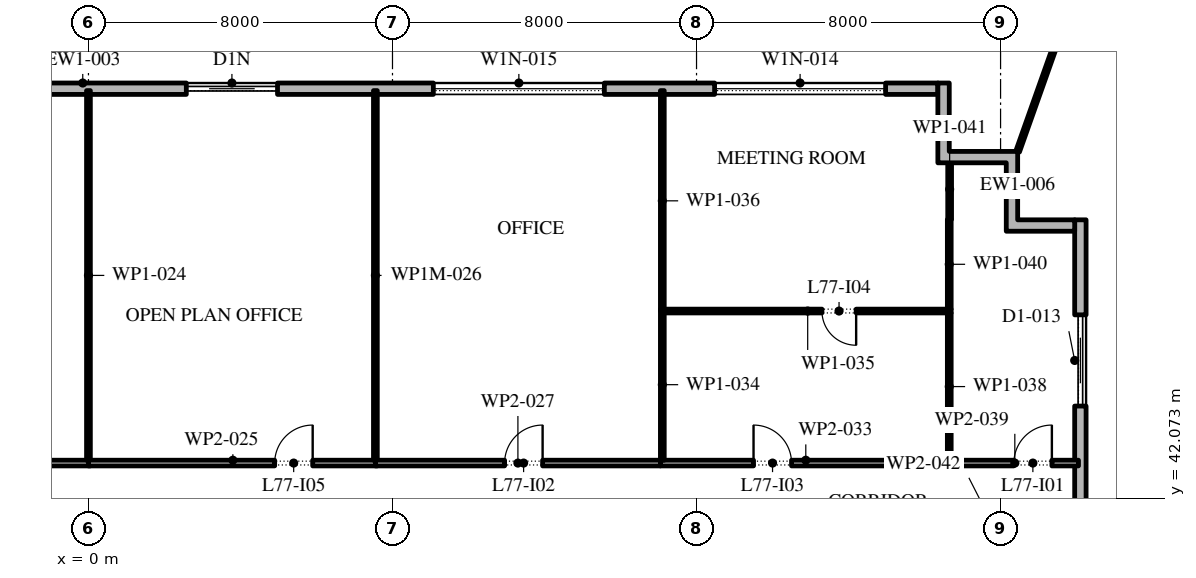
"""IFC4 building model, lengths in metres.
Left out: names, types, materials, properties, quantities, classifications, styles, units other than length and angle.
Written with IfcOpenShell. Run it as: python <this file> out.ifc"""

import sys

from ifc_helpers import new_model, si_unit, direction, frame, frame_2d, origin, place, context, subcontext, project, spatial, polyline, rectangle, outline, extrude, element, fill, save


model = new_model("IFC4")
c1 = context("Model", 3, precision=1e-05, world=origin(), true_north=direction((0.0, 1.0)))
c2 = subcontext(c1, "Body", "Model", "MODEL_VIEW")
j1 = project(units=[si_unit("LENGTHUNIT", "METRE"), si_unit("PLANEANGLEUNIT", "RADIAN")], contexts=[c1])
p1 = place(None, origin())
s1 = spatial("IfcSite", under=j1, at=p1, CompositionType="ELEMENT")
p2 = place(p1, origin())
s2 = spatial("IfcBuilding", under=s1, at=p2, CompositionType="ELEMENT")
p3 = place(p2, frame((0.0, 0.0, 351.0)))
s3 = spatial("IfcBuildingStorey", under=s2, at=p3, CompositionType="ELEMENT", Elevation=351.0)
p4 = place(p3, frame((26.1, -2.1, 0.0), z_axis=(0.0, 0.0, 1.0), x_axis=(0.0, 1.0, 0.0)))
e1 = element("IfcWall", 1, at=p4, inside=s3, PredefinedType="STANDARD", context=c2, shape_type="SweptSolid", body=[
    extrude(rectangle(XDim=51.5, YDim=0.3, at=frame_2d((25.75, 0.0))), origin(), (0.0, 0.0, 1.0), 4.0),
])
p5 = place(p4, frame((1.3, 0.0, 0.45)))
e2 = element("IfcOpeningElement", 2, at=p5, cuts=e1, PredefinedType="OPENING", context=c2, shape_type="SweptSolid", body=[
    extrude(rectangle(XDim=4.5, YDim=3.05, at=frame_2d((2.25, 1.525))), frame((0.0, 0.16, 0.0), z_axis=(0.0, -1.0, 0.0), x_axis=(1.0, 0.0, 0.0)), (0.0, 0.0, 1.0), 0.32),
])
p6 = place(p4, frame((8.55, 0.0, 0.45)))
e3 = element("IfcOpeningElement", 3, at=p6, cuts=e1, PredefinedType="OPENING", context=c2, shape_type="SweptSolid", body=[
    extrude(rectangle(XDim=4.5, YDim=3.05, at=frame_2d((2.25, 1.525))), frame((0.0, 0.16, 0.0), z_axis=(0.0, -1.0, 0.0), x_axis=(1.0, 0.0, 0.0)), (0.0, 0.0, 1.0), 0.32),
])
p7 = place(p4, frame((17.0, 0.0, 0.0)))
e4 = element("IfcOpeningElement", 4, at=p7, cuts=e1, PredefinedType="OPENING", context=c2, shape_type="SweptSolid", body=[
    extrude(rectangle(XDim=2.4, YDim=3.5, at=frame_2d((1.2, 1.75))), frame((0.0, 0.16, 0.0), z_axis=(0.0, -1.0, 0.0), x_axis=(1.0, 0.0, 0.0)), (0.0, 0.0, 1.0), 0.32),
])
p8 = place(p4, frame((23.35, 0.0, 0.45)))
e5 = element("IfcOpeningElement", 5, at=p8, cuts=e1, PredefinedType="OPENING", context=c2, shape_type="SweptSolid", body=[
    extrude(rectangle(XDim=4.5, YDim=3.05, at=frame_2d((2.25, 1.525))), frame((0.0, 0.16, 0.0), z_axis=(0.0, -1.0, 0.0), x_axis=(1.0, 0.0, 0.0)), (0.0, 0.0, 1.0), 0.32),
])
p9 = place(p4, frame((30.75, 0.0, 0.45)))
e6 = element("IfcOpeningElement", 6, at=p9, cuts=e1, PredefinedType="OPENING", context=c2, shape_type="SweptSolid", body=[
    extrude(rectangle(XDim=4.5, YDim=3.05, at=frame_2d((2.25, 1.525))), frame((0.0, 0.16, 0.0), z_axis=(0.0, -1.0, 0.0), x_axis=(1.0, 0.0, 0.0)), (0.0, 0.0, 1.0), 0.32),
])
p10 = place(p4, frame((38.15, 0.0, 0.45)))
e7 = element("IfcOpeningElement", 7, at=p10, cuts=e1, PredefinedType="OPENING", context=c2, shape_type="SweptSolid", body=[
    extrude(rectangle(XDim=4.5, YDim=3.05, at=frame_2d((2.25, 1.525))), frame((0.0, 0.16, 0.0), z_axis=(0.0, -1.0, 0.0), x_axis=(1.0, 0.0, 0.0)), (0.0, 0.0, 1.0), 0.32),
])
p11 = place(p4, frame((46.6, 0.0, 0.0)))
e8 = element("IfcOpeningElement", 8, at=p11, cuts=e1, PredefinedType="OPENING", context=c2, shape_type="SweptSolid", body=[
    extrude(rectangle(XDim=2.4, YDim=3.5, at=frame_2d((1.2, 1.75))), frame((0.0, 0.16, 0.0), z_axis=(0.0, -1.0, 0.0), x_axis=(1.0, 0.0, 0.0)), (0.0, 0.0, 1.0), 0.32),
])
p12 = place(p3, frame((22.35, 52.85, 0.0), z_axis=(0.0, 0.0, 1.0), x_axis=(-1.0, 0.0, 0.0)))
e9 = element("IfcWall", 9, at=p12, inside=s3, PredefinedType="STANDARD", context=c2, shape_type="SweptSolid", body=[
    extrude(rectangle(XDim=45.0, YDim=0.3, at=frame_2d((22.5, 0.0))), origin(), (0.0, 0.0, 1.0), 4.0),
])
p13 = place(p12, frame((1.375, 0.0, 0.45)))
e10 = element("IfcOpeningElement", 10, at=p13, cuts=e9, PredefinedType="OPENING", context=c2, shape_type="SweptSolid", body=[
    extrude(rectangle(XDim=4.5, YDim=2.525, at=frame_2d((2.25, 1.262))), frame((0.0, 0.16, 0.0), z_axis=(0.0, -1.0, 0.0), x_axis=(1.0, 0.0, 0.0)), (0.0, 0.0, 1.0), 0.32),
])
p14 = place(p12, frame((8.775, 0.0, 0.45)))
e11 = element("IfcOpeningElement", 11, at=p14, cuts=e9, PredefinedType="OPENING", context=c2, shape_type="SweptSolid", body=[
    extrude(rectangle(XDim=4.5, YDim=2.525, at=frame_2d((2.25, 1.262))), frame((0.0, 0.16, 0.0), z_axis=(0.0, -1.0, 0.0), x_axis=(1.0, 0.0, 0.0)), (0.0, 0.0, 1.0), 0.32),
])
p15 = place(p12, frame((17.375, 0.0, 0.0)))
e12 = element("IfcOpeningElement", 12, at=p15, cuts=e9, PredefinedType="OPENING", context=c2, shape_type="SweptSolid", body=[
    extrude(rectangle(XDim=2.4, YDim=2.975, at=frame_2d((1.2, 1.488))), frame((0.0, 0.16, 0.0), z_axis=(0.0, -1.0, 0.0), x_axis=(1.0, 0.0, 0.0)), (0.0, 0.0, 1.0), 0.32),
])
p16 = place(p12, frame((23.875, 0.0, 0.45)))
e13 = element("IfcOpeningElement", 13, at=p16, cuts=e9, PredefinedType="OPENING", context=c2, shape_type="SweptSolid", body=[
    extrude(rectangle(XDim=4.5, YDim=2.525, at=frame_2d((2.25, 1.262))), frame((0.0, 0.16, 0.0), z_axis=(0.0, -1.0, 0.0), x_axis=(1.0, 0.0, 0.0)), (0.0, 0.0, 1.0), 0.32),
])
p17 = place(p12, frame((31.425, 0.0, 0.45)))
e14 = element("IfcOpeningElement", 14, at=p17, cuts=e9, PredefinedType="OPENING", context=c2, shape_type="SweptSolid", body=[
    extrude(rectangle(XDim=4.5, YDim=2.525, at=frame_2d((2.25, 1.262))), frame((0.0, 0.16, 0.0), z_axis=(0.0, -1.0, 0.0), x_axis=(1.0, 0.0, 0.0)), (0.0, 0.0, 1.0), 0.32),
])
p18 = place(p12, frame((38.975, 0.0, 0.45)))
e15 = element("IfcOpeningElement", 15, at=p18, cuts=e9, PredefinedType="OPENING", context=c2, shape_type="SweptSolid", body=[
    extrude(rectangle(XDim=4.5, YDim=2.525, at=frame_2d((2.25, 1.262))), frame((0.0, 0.16, 0.0), z_axis=(0.0, -1.0, 0.0), x_axis=(1.0, 0.0, 0.0)), (0.0, 0.0, 1.0), 0.32),
])
p19 = place(p3, origin())
e16 = element("IfcWall", 16, at=p19, inside=s3, PredefinedType="STANDARD", context=c2, shape_type="SweptSolid", body=[
    extrude(outline(polyline([(24.15, 50.9), (22.35, 50.9), (22.35, 53.0), (22.65, 53.0), (22.65, 51.2), (24.45, 51.2), (24.45, 49.4), (25.95, 49.4), (25.95, 49.1), (24.15, 49.1), (24.15, 50.9)])), origin(), (0.0, 0.0, 1.0), 4.0),
])
p20 = place(p3, frame((24.45, 51.2, -0.05), z_axis=(0.0, 0.0, 1.0), x_axis=(0.334395746366, 0.942432748164, 0.0)))
e17 = element("IfcWall", 17, at=p20, inside=s3, PredefinedType="STANDARD", context=c2, shape_type="SweptSolid", body=[
    extrude(rectangle(XDim=6.45, YDim=0.1, at=frame_2d((3.225, 0.0))), origin(), (0.0, 0.0, 1.0), 4.05),
])
p21 = place(p3, frame((-7.55, 43.0, 0.0), z_axis=(0.0, 0.0, 1.0), x_axis=(1.0, 0.0, 0.0)))
e18 = element("IfcWall", 18, at=p21, inside=s3, PredefinedType="PARTITIONING", context=c2, shape_type="SweptSolid", body=[
    extrude(rectangle(XDim=7.6, YDim=0.15, at=frame_2d((3.8, 0.0))), origin(), (0.0, 0.0, 1.0), 4.0),
])
p22 = place(p21, frame((4.15, 0.0, 0.0)))
e19 = element("IfcOpeningElement", 19, at=p22, cuts=e18, PredefinedType="OPENING", context=c2, shape_type="SweptSolid", body=[
    extrude(rectangle(XDim=1.0, YDim=2.1, at=frame_2d((0.5, 1.05))), frame((0.0, 0.085, 0.0), z_axis=(0.0, -1.0, 0.0), x_axis=(1.0, 0.0, 0.0)), (0.0, 0.0, 1.0), 0.17),
])
p23 = place(p3, frame((0.0, 43.075, 0.0), z_axis=(0.0, 0.0, 1.0), x_axis=(0.0, 1.0, 0.0)))
e20 = element("IfcWall", 20, at=p23, inside=s3, PredefinedType="PARTITIONING", context=c2, shape_type="SweptSolid", body=[
    extrude(rectangle(XDim=9.725, YDim=0.1, at=frame_2d((4.863, 0.0))), origin(), (0.0, 0.0, 1.0), 4.0),
])
p24 = place(p3, frame((0.0, 43.0, 0.0), z_axis=(0.0, 0.0, 1.0), x_axis=(1.0, 0.0, 0.0)))
e21 = element("IfcWall", 21, at=p24, inside=s3, PredefinedType="PARTITIONING", context=c2, shape_type="SweptSolid", body=[
    extrude(rectangle(XDim=7.6, YDim=0.15, at=frame_2d((3.8, 0.0))), origin(), (0.0, 0.0, 1.0), 4.0),
])
p25 = place(p24, frame((4.9, 0.0, 0.0)))
e22 = element("IfcOpeningElement", 22, at=p25, cuts=e21, PredefinedType="OPENING", context=c2, shape_type="SweptSolid", body=[
    extrude(rectangle(XDim=1.0, YDim=2.1, at=frame_2d((0.5, 1.05))), frame((0.0, 0.085, 0.0), z_axis=(0.0, -1.0, 0.0), x_axis=(1.0, 0.0, 0.0)), (0.0, 0.0, 1.0), 0.17),
])
p26 = place(p3, frame((7.55, 43.075, 0.0), z_axis=(0.0, 0.0, 1.0), x_axis=(0.0, 1.0, 0.0)))
e23 = element("IfcWall", 23, at=p26, inside=s3, PredefinedType="PARTITIONING", context=c2, shape_type="SweptSolid", body=[
    extrude(rectangle(XDim=9.725, YDim=0.1, at=frame_2d((4.863, 0.0))), origin(), (0.0, 0.0, 1.0), 3.096),
])
p27 = place(p3, frame((7.55, 43.0, 0.0), z_axis=(0.0, 0.0, 1.0), x_axis=(1.0, 0.0, 0.0)))
e24 = element("IfcWall", 24, at=p27, inside=s3, PredefinedType="PARTITIONING", context=c2, shape_type="SweptSolid", body=[
    extrude(rectangle(XDim=7.5, YDim=0.15, at=frame_2d((3.75, 0.0))), origin(), (0.0, 0.0, 1.0), 4.0),
])
p28 = place(p27, frame((3.4, 0.0, 0.0)))
e25 = element("IfcOpeningElement", 25, at=p28, cuts=e24, PredefinedType="OPENING", context=c2, shape_type="SweptSolid", body=[
    extrude(rectangle(XDim=1.0, YDim=2.1, at=frame_2d((0.5, 1.05))), frame((0.0, 0.085, 0.0), z_axis=(0.0, -1.0, 0.0), x_axis=(1.0, 0.0, 0.0)), (0.0, 0.0, 1.0), 0.17),
])
p29 = place(p3, frame((15.05, 43.0, 0.0), z_axis=(0.0, 0.0, 1.0), x_axis=(1.0, 0.0, 0.0)))
e26 = element("IfcWall", 26, at=p29, inside=s3, PredefinedType="PARTITIONING", context=c2, shape_type="SweptSolid", body=[
    extrude(rectangle(XDim=7.65, YDim=0.15, at=frame_2d((3.825, 0.0))), origin(), (0.0, 0.0, 1.0), 4.0),
])
p30 = place(p29, frame((2.45, 0.0, 0.0)))
e27 = element("IfcOpeningElement", 27, at=p30, cuts=e26, PredefinedType="OPENING", context=c2, shape_type="SweptSolid", body=[
    extrude(rectangle(XDim=1.0, YDim=2.1, at=frame_2d((0.5, 1.05))), frame((0.0, 0.085, 0.0), z_axis=(0.0, -1.0, 0.0), x_axis=(1.0, 0.0, 0.0)), (0.0, 0.0, 1.0), 0.17),
])
p31 = place(p3, frame((15.1, 47.05, 0.0), z_axis=(0.0, 0.0, 1.0), x_axis=(0.0, -1.0, 0.0)))
e28 = element("IfcWall", 28, at=p31, inside=s3, PredefinedType="PARTITIONING", context=c2, shape_type="SweptSolid", body=[
    extrude(rectangle(XDim=3.975, YDim=0.1, at=frame_2d((1.988, 0.0))), origin(), (0.0, 0.0, 1.0), 4.0),
])
p32 = place(p3, frame((15.15, 47.0, 0.0), z_axis=(0.0, 0.0, 1.0), x_axis=(1.0, 0.0, 0.0)))
e29 = element("IfcWall", 29, at=p32, inside=s3, PredefinedType="PARTITIONING", context=c2, shape_type="SweptSolid", body=[
    extrude(rectangle(XDim=7.55, YDim=0.1, at=frame_2d((3.775, 0.0))), origin(), (0.0, 0.0, 1.0), 4.0),
])
p33 = place(p32, frame((4.15, 0.0, 0.0)))
e30 = element("IfcOpeningElement", 30, at=p33, cuts=e29, PredefinedType="OPENING", context=c2, shape_type="SweptSolid", body=[
    extrude(rectangle(XDim=0.9, YDim=2.1, at=frame_2d((0.45, 1.05))), frame((0.0, 0.06, 0.0), z_axis=(0.0, -1.0, 0.0), x_axis=(1.0, 0.0, 0.0)), (0.0, 0.0, 1.0), 0.12),
])
p34 = place(p3, frame((15.1, 52.8, 0.0), z_axis=(0.0, 0.0, 1.0), x_axis=(0.0, -1.0, 0.0)))
e31 = element("IfcWall", 31, at=p34, inside=s3, PredefinedType="PARTITIONING", context=c2, shape_type="SweptSolid", body=[
    extrude(rectangle(XDim=5.8, YDim=0.1, at=frame_2d((2.9, 0.0))), origin(), (0.0, 0.0, 1.0), 4.0),
])
p35 = place(p3, frame((22.65, 43.075, 0.0), z_axis=(0.0, 0.0, 1.0), x_axis=(0.0, 1.0, 0.0)))
e32 = element("IfcWall", 32, at=p35, inside=s3, PredefinedType="PARTITIONING", context=c2, shape_type="SweptSolid", body=[
    extrude(rectangle(XDim=3.875, YDim=0.1, at=frame_2d((1.938, 0.0))), origin(), (0.0, 0.0, 1.0), 4.0),
])
p36 = place(p3, frame((22.7, 43.0, 0.0), z_axis=(0.0, 0.0, 1.0), x_axis=(1.0, 0.0, 0.0)))
e33 = element("IfcWall", 33, at=p36, inside=s3, PredefinedType="PARTITIONING", context=c2, shape_type="SweptSolid", body=[
    extrude(rectangle(XDim=3.35, YDim=0.15, at=frame_2d((1.675, 0.0))), origin(), (0.0, 0.0, 1.0), 4.0),
])
p37 = place(p36, frame((1.65, 0.0, 0.0)))
e34 = element("IfcOpeningElement", 34, at=p37, cuts=e33, PredefinedType="OPENING", context=c2, shape_type="SweptSolid", body=[
    extrude(rectangle(XDim=1.0, YDim=2.1, at=frame_2d((0.5, 1.05))), frame((0.0, 0.085, 0.0), z_axis=(0.0, -1.0, 0.0), x_axis=(1.0, 0.0, 0.0)), (0.0, 0.0, 1.0), 0.17),
])
p38 = place(p3, frame((22.65, 47.05, 0.0), z_axis=(0.0, 0.0, 1.0), x_axis=(0.0, 1.0, 0.0)))
e35 = element("IfcWall", 35, at=p38, inside=s3, PredefinedType="PARTITIONING", context=c2, shape_type="SweptSolid", body=[
    extrude(rectangle(XDim=2.36, YDim=0.1, at=frame_2d((1.18, 0.0))), origin(), (0.0, 0.0, 1.0), 4.0),
])
p39 = place(p3, frame((22.66, 49.41, 0.0), z_axis=(0.0, 0.0, 1.0), x_axis=(0.0, 1.0, 0.0)))
e36 = element("IfcWall", 36, at=p39, inside=s3, PredefinedType="PARTITIONING", context=c2, shape_type="SweptSolid", body=[
    extrude(rectangle(XDim=1.59, YDim=0.1, at=frame_2d((0.795, 0.0))), origin(), (0.0, 0.0, 1.0), 4.0),
])
p40 = place(p11, origin())
e37 = element("IfcDoor", 37, at=p40, inside=s3, OperationType="DOUBLE_DOOR_SLIDING", PredefinedType="DOOR", context=c2, shape_type="SweptSolid", body=[
    extrude(rectangle(XDim=2.4, YDim=3.5, at=frame_2d((1.2, 1.75))), frame((0.0, 0.025, 0.0), z_axis=(0.0, -1.0, 0.0), x_axis=(1.0, 0.0, 0.0)), (0.0, 0.0, 1.0), 0.05),
])
fill(e8, e37)
p41 = place(p13, origin())
e38 = element("IfcWindow", 38, at=p41, inside=s3, PartitioningType="DOUBLE_PANEL_VERTICAL", PredefinedType="WINDOW", context=c2, shape_type="SweptSolid", body=[
    extrude(rectangle(XDim=4.5, YDim=2.525, at=frame_2d((2.25, 1.262))), frame((0.0, 0.03, 0.0), z_axis=(0.0, -1.0, 0.0), x_axis=(1.0, 0.0, 0.0)), (0.0, 0.0, 1.0), 0.06),
])
fill(e10, e38)
p42 = place(p14, origin())
e39 = element("IfcWindow", 39, at=p42, inside=s3, PartitioningType="DOUBLE_PANEL_VERTICAL", PredefinedType="WINDOW", context=c2, shape_type="SweptSolid", body=[
    extrude(rectangle(XDim=4.5, YDim=2.525, at=frame_2d((2.25, 1.262))), frame((0.0, 0.03, 0.0), z_axis=(0.0, -1.0, 0.0), x_axis=(1.0, 0.0, 0.0)), (0.0, 0.0, 1.0), 0.06),
])
fill(e11, e39)
p43 = place(p15, origin())
e40 = element("IfcDoor", 40, at=p43, inside=s3, OperationType="DOUBLE_DOOR_SLIDING", PredefinedType="DOOR", context=c2, shape_type="SweptSolid", body=[
    extrude(rectangle(XDim=2.4, YDim=2.975, at=frame_2d((1.2, 1.488))), frame((0.0, 0.025, 0.0), z_axis=(0.0, -1.0, 0.0), x_axis=(1.0, 0.0, 0.0)), (0.0, 0.0, 1.0), 0.05),
])
fill(e12, e40)
p44 = place(p37, origin())
e41 = element("IfcDoor", 41, at=p44, inside=s3, OperationType="SINGLE_SWING_LEFT", PredefinedType="DOOR", context=c2, shape_type="SweptSolid", body=[
    extrude(rectangle(XDim=1.0, YDim=2.1, at=frame_2d((0.5, 1.05))), frame((0.0, 0.025, 0.0), z_axis=(0.0, -1.0, 0.0), x_axis=(1.0, 0.0, 0.0)), (0.0, 0.0, 1.0), 0.05),
])
fill(e34, e41)
p45 = place(p28, origin())
e42 = element("IfcDoor", 42, at=p45, inside=s3, OperationType="SINGLE_SWING_LEFT", PredefinedType="DOOR", context=c2, shape_type="SweptSolid", body=[
    extrude(rectangle(XDim=1.0, YDim=2.1, at=frame_2d((0.5, 1.05))), frame((0.0, 0.025, 0.0), z_axis=(0.0, -1.0, 0.0), x_axis=(1.0, 0.0, 0.0)), (0.0, 0.0, 1.0), 0.05),
])
fill(e25, e42)
p46 = place(p30, origin())
e43 = element("IfcDoor", 43, at=p46, inside=s3, OperationType="SINGLE_SWING_RIGHT", PredefinedType="DOOR", context=c2, shape_type="SweptSolid", body=[
    extrude(rectangle(XDim=1.0, YDim=2.1, at=frame_2d((0.5, 1.05))), frame((0.0, 0.025, 0.0), z_axis=(0.0, -1.0, 0.0), x_axis=(1.0, 0.0, 0.0)), (0.0, 0.0, 1.0), 0.05),
])
fill(e27, e43)
p47 = place(p33, frame((0.9, 0.0, 0.0), z_axis=(0.0, 0.0, 1.0), x_axis=(-1.0, 0.0, 0.0)))
e44 = element("IfcDoor", 44, at=p47, inside=s3, OperationType="SINGLE_SWING_RIGHT", PredefinedType="DOOR", context=c2, shape_type="SweptSolid", body=[
    extrude(rectangle(XDim=0.9, YDim=2.1, at=frame_2d((0.45, 1.05))), frame((0.0, 0.025, 0.0), z_axis=(0.0, -1.0, 0.0), x_axis=(1.0, 0.0, 0.0)), (0.0, 0.0, 1.0), 0.05),
])
fill(e30, e44)
p48 = place(p25, origin())
e45 = element("IfcDoor", 45, at=p48, inside=s3, OperationType="SINGLE_SWING_LEFT", PredefinedType="DOOR", context=c2, shape_type="SweptSolid", body=[
    extrude(rectangle(XDim=1.0, YDim=2.1, at=frame_2d((0.5, 1.05))), frame((0.0, 0.025, 0.0), z_axis=(0.0, -1.0, 0.0), x_axis=(1.0, 0.0, 0.0)), (0.0, 0.0, 1.0), 0.05),
])
fill(e22, e45)
save(model, sys.argv[1])
